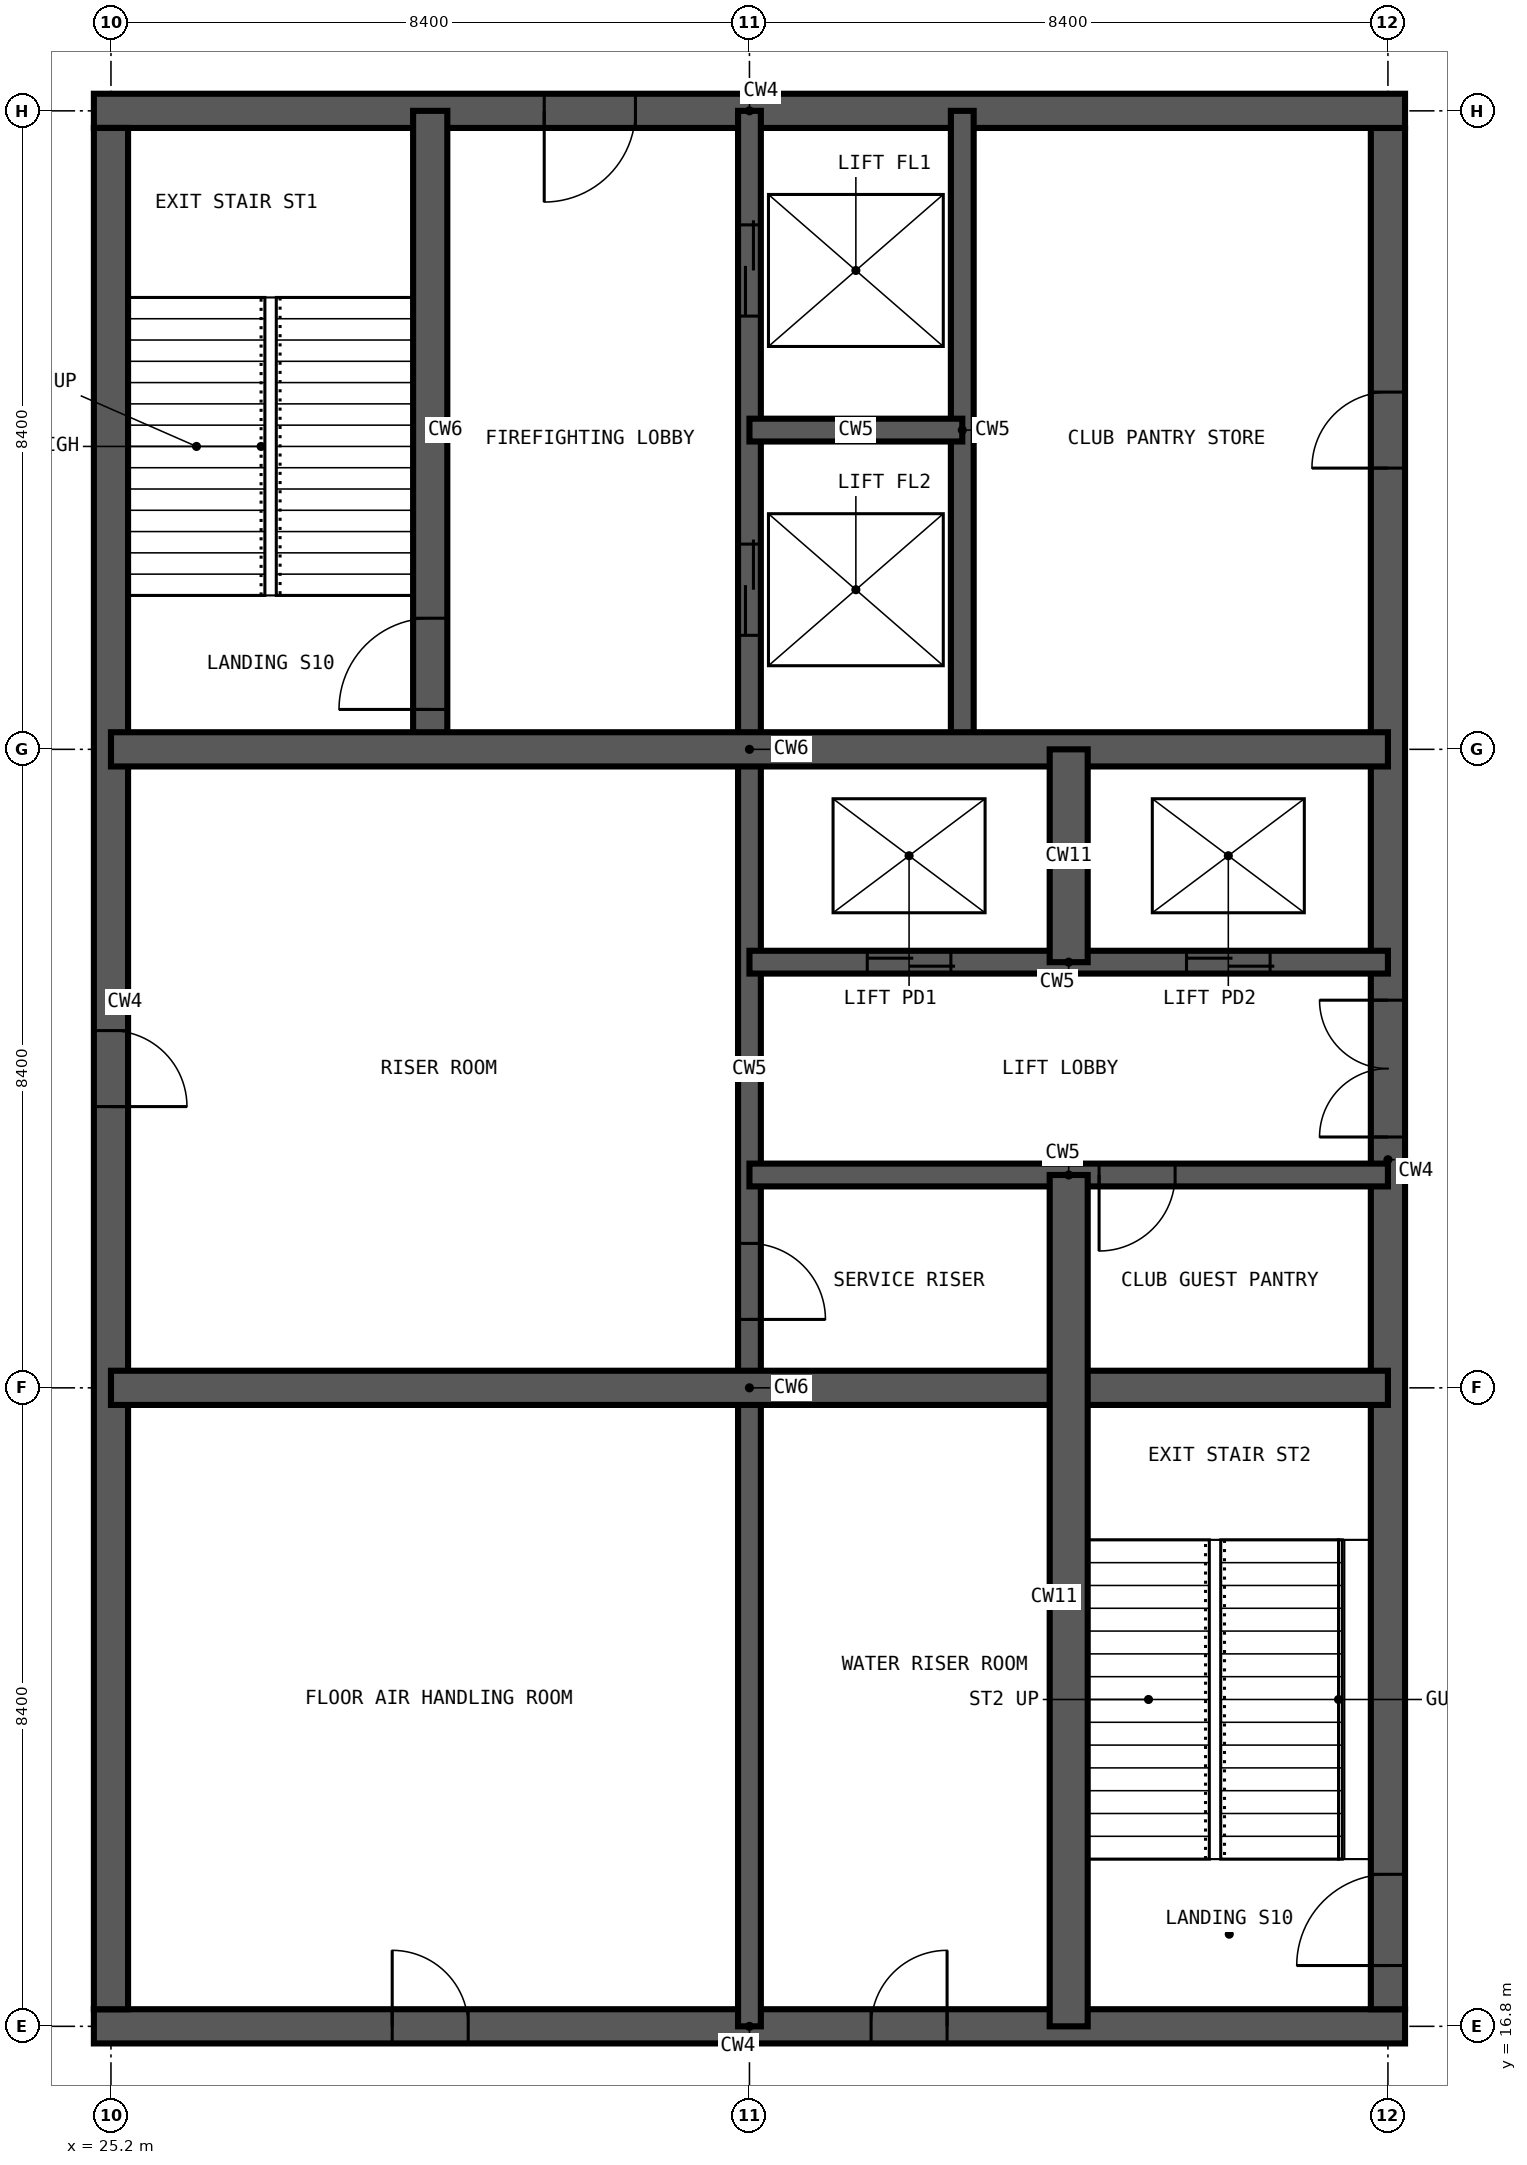
"""IFC4 building model, lengths in metres.
Left out: names, types, materials, properties, quantities, classifications, styles, units other than length and angle.
Written with IfcOpenShell. Run it as: python <this file> out.ifc"""

import sys

from ifc_helpers import new_model, si_unit, direction, frame, frame_2d, origin, place, context, subcontext, project, spatial, rectangle, extrude, element, fill, save


model = new_model("IFC4")
c1 = context("Model", 3, precision=1e-05, world=origin(), true_north=direction((0.0, 1.0)))
c2 = subcontext(c1, "Body", "Model", "MODEL_VIEW")
j1 = project(units=[si_unit("LENGTHUNIT", "METRE"), si_unit("PLANEANGLEUNIT", "RADIAN")], contexts=[c1])
p1 = place(None, origin())
s1 = spatial("IfcSite", under=j1, at=p1, CompositionType="ELEMENT")
p2 = place(p1, origin())
s2 = spatial("IfcBuilding", under=s1, at=p2, CompositionType="ELEMENT")
p3 = place(p2, frame((0.0, 0.0, 284.1)))
s3 = spatial("IfcBuildingStorey", under=s2, at=p3, CompositionType="ELEMENT", Elevation=284.1)
p4 = place(p3, frame((24.975, 16.8, -0.35), z_axis=(0.0, 0.0, 1.0), x_axis=(1.0, 0.0, 0.0)))
e1 = element("IfcWall", 1, at=p4, inside=s3, PredefinedType="SHEAR", context=c2, shape_type="SweptSolid", body=[
    extrude(rectangle(XDim=17.25, YDim=0.45, at=frame_2d((8.625, 0.0))), origin(), (0.0, 0.0, 1.0), 5.0),
])
p5 = place(p4, frame((3.925, 0.0, 0.35)))
e2 = element("IfcOpeningElement", 2, at=p5, cuts=e1, PredefinedType="OPENING", context=c2, shape_type="SweptSolid", body=[
    extrude(rectangle(XDim=1.0, YDim=2.1, at=frame_2d((0.5, 1.05))), frame((0.0, 0.235, 0.0), z_axis=(0.0, -1.0, 0.0), x_axis=(1.0, 0.0, 0.0)), (0.0, 0.0, 1.0), 0.47),
])
p6 = place(p4, frame((10.225, 0.0, 0.35)))
e3 = element("IfcOpeningElement", 3, at=p6, cuts=e1, PredefinedType="OPENING", context=c2, shape_type="SweptSolid", body=[
    extrude(rectangle(XDim=1.0, YDim=2.1, at=frame_2d((0.5, 1.05))), frame((0.0, 0.235, 0.0), z_axis=(0.0, -1.0, 0.0), x_axis=(1.0, 0.0, 0.0)), (0.0, 0.0, 1.0), 0.47),
])
p7 = place(p3, frame((42.0, 17.025, -0.35), z_axis=(0.0, 0.0, 1.0), x_axis=(0.0, 1.0, 0.0)))
e4 = element("IfcWall", 4, at=p7, inside=s3, PredefinedType="SHEAR", context=c2, shape_type="SweptSolid", body=[
    extrude(rectangle(XDim=24.75, YDim=0.45, at=frame_2d((12.375, 0.0))), origin(), (0.0, 0.0, 1.0), 5.0),
])
p8 = place(p7, frame((0.575, 0.0, 0.35)))
e5 = element("IfcOpeningElement", 5, at=p8, cuts=e4, PredefinedType="OPENING", context=c2, shape_type="SweptSolid", body=[
    extrude(rectangle(XDim=1.2, YDim=2.2, at=frame_2d((0.6, 1.1))), frame((0.0, 0.235, 0.0), z_axis=(0.0, -1.0, 0.0), x_axis=(1.0, 0.0, 0.0)), (0.0, 0.0, 1.0), 0.47),
])
p9 = place(p7, frame((11.475, 0.0, 0.35)))
e6 = element("IfcOpeningElement", 6, at=p9, cuts=e4, PredefinedType="OPENING", context=c2, shape_type="SweptSolid", body=[
    extrude(rectangle(XDim=1.8, YDim=2.2, at=frame_2d((0.9, 1.1))), frame((0.0, 0.235, 0.0), z_axis=(0.0, -1.0, 0.0), x_axis=(1.0, 0.0, 0.0)), (0.0, 0.0, 1.0), 0.47),
])
p10 = place(p7, frame((20.275, 0.0, 0.35)))
e7 = element("IfcOpeningElement", 7, at=p10, cuts=e4, PredefinedType="OPENING", context=c2, shape_type="SweptSolid", body=[
    extrude(rectangle(XDim=1.0, YDim=2.1, at=frame_2d((0.5, 1.05))), frame((0.0, 0.235, 0.0), z_axis=(0.0, -1.0, 0.0), x_axis=(1.0, 0.0, 0.0)), (0.0, 0.0, 1.0), 0.47),
])
p11 = place(p3, frame((42.225, 42.0, -0.35), z_axis=(0.0, 0.0, 1.0), x_axis=(-1.0, 0.0, 0.0)))
e8 = element("IfcWall", 8, at=p11, inside=s3, PredefinedType="SHEAR", context=c2, shape_type="SweptSolid", body=[
    extrude(rectangle(XDim=17.25, YDim=0.45, at=frame_2d((8.625, 0.0))), origin(), (0.0, 0.0, 1.0), 5.0),
])
p12 = place(p11, frame((10.125, 0.0, 0.35)))
e9 = element("IfcOpeningElement", 9, at=p12, cuts=e8, PredefinedType="OPENING", context=c2, shape_type="SweptSolid", body=[
    extrude(rectangle(XDim=1.2, YDim=2.2, at=frame_2d((0.6, 1.1))), frame((0.0, 0.235, 0.0), z_axis=(0.0, -1.0, 0.0), x_axis=(1.0, 0.0, 0.0)), (0.0, 0.0, 1.0), 0.47),
])
p13 = place(p3, frame((25.2, 41.775, -0.35), z_axis=(0.0, 0.0, 1.0), x_axis=(0.0, -1.0, 0.0)))
e10 = element("IfcWall", 10, at=p13, inside=s3, PredefinedType="SHEAR", context=c2, shape_type="SweptSolid", body=[
    extrude(rectangle(XDim=24.75, YDim=0.45, at=frame_2d((12.375, 0.0))), origin(), (0.0, 0.0, 1.0), 5.0),
])
p14 = place(p13, frame((11.875, 0.0, 0.35)))
e11 = element("IfcOpeningElement", 11, at=p14, cuts=e10, PredefinedType="OPENING", context=c2, shape_type="SweptSolid", body=[
    extrude(rectangle(XDim=1.0, YDim=2.1, at=frame_2d((0.5, 1.05))), frame((0.0, 0.235, 0.0), z_axis=(0.0, -1.0, 0.0), x_axis=(1.0, 0.0, 0.0)), (0.0, 0.0, 1.0), 0.47),
])
p15 = place(p3, frame((33.6, 16.8, -0.35), z_axis=(0.0, 0.0, 1.0), x_axis=(0.0, 1.0, 0.0)))
e12 = element("IfcWall", 12, at=p15, inside=s3, PredefinedType="SHEAR", context=c2, shape_type="SweptSolid", body=[
    extrude(rectangle(XDim=25.2, YDim=0.3, at=frame_2d((12.6, 0.0))), origin(), (0.0, 0.0, 1.0), 5.0),
])
p16 = place(p15, frame((22.5, 0.0, 0.35)))
e13 = element("IfcOpeningElement", 13, at=p16, cuts=e12, PredefinedType="OPENING", context=c2, shape_type="SweptSolid", body=[
    extrude(rectangle(XDim=1.2, YDim=2.2, at=frame_2d((0.6, 1.1))), frame((0.0, 0.16, 0.0), z_axis=(0.0, -1.0, 0.0), x_axis=(1.0, 0.0, 0.0)), (0.0, 0.0, 1.0), 0.32),
])
p17 = place(p15, frame((18.3, 0.0, 0.35)))
e14 = element("IfcOpeningElement", 14, at=p17, cuts=e12, PredefinedType="OPENING", context=c2, shape_type="SweptSolid", body=[
    extrude(rectangle(XDim=1.2, YDim=2.2, at=frame_2d((0.6, 1.1))), frame((0.0, 0.16, 0.0), z_axis=(0.0, -1.0, 0.0), x_axis=(1.0, 0.0, 0.0)), (0.0, 0.0, 1.0), 0.32),
])
p18 = place(p15, frame((9.3, 0.0, 0.35)))
e15 = element("IfcOpeningElement", 15, at=p18, cuts=e12, PredefinedType="OPENING", context=c2, shape_type="SweptSolid", body=[
    extrude(rectangle(XDim=1.0, YDim=2.1, at=frame_2d((0.5, 1.05))), frame((0.0, 0.16, 0.0), z_axis=(0.0, -1.0, 0.0), x_axis=(1.0, 0.0, 0.0)), (0.0, 0.0, 1.0), 0.32),
])
p19 = place(p3, frame((36.4, 33.6, -0.35), z_axis=(0.0, 0.0, 1.0), x_axis=(0.0, 1.0, 0.0)))
e16 = element("IfcWall", 16, at=p19, inside=s3, PredefinedType="SHEAR", context=c2, shape_type="SweptSolid", body=[
    extrude(rectangle(XDim=8.4, YDim=0.3, at=frame_2d((4.2, 0.0))), origin(), (0.0, 0.0, 1.0), 5.0),
])
p20 = place(p3, frame((33.6, 28.0, -0.35), z_axis=(0.0, 0.0, 1.0), x_axis=(1.0, 0.0, 0.0)))
e17 = element("IfcWall", 17, at=p20, inside=s3, PredefinedType="SHEAR", context=c2, shape_type="SweptSolid", body=[
    extrude(rectangle(XDim=8.4, YDim=0.3, at=frame_2d((4.2, 0.0))), origin(), (0.0, 0.0, 1.0), 5.0),
])
p21 = place(p20, frame((4.6, 0.0, 0.35)))
e18 = element("IfcOpeningElement", 18, at=p21, cuts=e17, PredefinedType="OPENING", context=c2, shape_type="SweptSolid", body=[
    extrude(rectangle(XDim=1.0, YDim=2.1, at=frame_2d((0.5, 1.05))), frame((0.0, 0.16, 0.0), z_axis=(0.0, -1.0, 0.0), x_axis=(1.0, 0.0, 0.0)), (0.0, 0.0, 1.0), 0.32),
])
p22 = place(p3, frame((33.6, 30.8, -0.35), z_axis=(0.0, 0.0, 1.0), x_axis=(1.0, 0.0, 0.0)))
e19 = element("IfcWall", 19, at=p22, inside=s3, PredefinedType="SHEAR", context=c2, shape_type="SweptSolid", body=[
    extrude(rectangle(XDim=8.4, YDim=0.3, at=frame_2d((4.2, 0.0))), origin(), (0.0, 0.0, 1.0), 5.0),
])
p23 = place(p22, frame((1.55, 0.0, 0.35)))
e20 = element("IfcOpeningElement", 20, at=p23, cuts=e19, PredefinedType="OPENING", context=c2, shape_type="SweptSolid", body=[
    extrude(rectangle(XDim=1.1, YDim=2.2, at=frame_2d((0.55, 1.1))), frame((0.0, 0.16, 0.0), z_axis=(0.0, -1.0, 0.0), x_axis=(1.0, 0.0, 0.0)), (0.0, 0.0, 1.0), 0.32),
])
p24 = place(p22, frame((5.75, 0.0, 0.35)))
e21 = element("IfcOpeningElement", 21, at=p24, cuts=e19, PredefinedType="OPENING", context=c2, shape_type="SweptSolid", body=[
    extrude(rectangle(XDim=1.1, YDim=2.2, at=frame_2d((0.55, 1.1))), frame((0.0, 0.16, 0.0), z_axis=(0.0, -1.0, 0.0), x_axis=(1.0, 0.0, 0.0)), (0.0, 0.0, 1.0), 0.32),
])
p25 = place(p3, frame((33.6, 37.8, -0.35), z_axis=(0.0, 0.0, 1.0), x_axis=(1.0, 0.0, 0.0)))
e22 = element("IfcWall", 22, at=p25, inside=s3, PredefinedType="SHEAR", context=c2, shape_type="SweptSolid", body=[
    extrude(rectangle(XDim=2.8, YDim=0.3, at=frame_2d((1.4, 0.0))), origin(), (0.0, 0.0, 1.0), 5.0),
])
p26 = place(p3, frame((29.4, 33.6, -0.35), z_axis=(0.0, 0.0, 1.0), x_axis=(0.0, 1.0, 0.0)))
e23 = element("IfcWall", 23, at=p26, inside=s3, PredefinedType="SHEAR", context=c2, shape_type="SweptSolid", body=[
    extrude(rectangle(XDim=8.4, YDim=0.45, at=frame_2d((4.2, 0.0))), origin(), (0.0, 0.0, 1.0), 5.0),
])
p27 = place(p26, frame((0.525, 0.0, 0.35)))
e24 = element("IfcOpeningElement", 24, at=p27, cuts=e23, PredefinedType="OPENING", context=c2, shape_type="SweptSolid", body=[
    extrude(rectangle(XDim=1.2, YDim=2.2, at=frame_2d((0.6, 1.1))), frame((0.0, 0.235, 0.0), z_axis=(0.0, -1.0, 0.0), x_axis=(1.0, 0.0, 0.0)), (0.0, 0.0, 1.0), 0.47),
])
for number, where, z_axis, x_axis in (
    (25, (25.2, 25.2, -0.35), (0.0, 0.0, 1.0), (1.0, 0.0, 0.0)),
    (26, (25.2, 33.6, -0.35), (0.0, 0.0, 1.0), (1.0, 0.0, 0.0)),
):
    element("IfcWall", number, at=place(p3, frame(where, z_axis=z_axis, x_axis=x_axis)), inside=s3, PredefinedType="SHEAR", context=c2, shape_type="SweptSolid", body=[
        extrude(rectangle(XDim=16.8, YDim=0.45, at=frame_2d((8.4, 0.0))), origin(), (0.0, 0.0, 1.0), 5.0),
    ])
p28 = place(p3, frame((37.8, 16.8, -0.35), z_axis=(0.0, 0.0, 1.0), x_axis=(0.0, 1.0, 0.0)))
e27 = element("IfcWall", 27, at=p28, inside=s3, PredefinedType="SHEAR", context=c2, shape_type="SweptSolid", body=[
    extrude(rectangle(XDim=11.2, YDim=0.5, at=frame_2d((5.6, 0.0))), origin(), (0.0, 0.0, 1.0), 5.0),
])
p29 = place(p3, frame((37.8, 30.8, -0.35), z_axis=(0.0, 0.0, 1.0), x_axis=(0.0, 1.0, 0.0)))
e28 = element("IfcWall", 28, at=p29, inside=s3, PredefinedType="SHEAR", context=c2, shape_type="SweptSolid", body=[
    extrude(rectangle(XDim=2.8, YDim=0.5, at=frame_2d((1.4, 0.0))), origin(), (0.0, 0.0, 1.0), 5.0),
])
p30 = place(p27, origin())
e29 = element("IfcDoor", 29, at=p30, inside=s3, OperationType="SINGLE_SWING_LEFT", PredefinedType="DOOR", context=c2, shape_type="SweptSolid", body=[
    extrude(rectangle(XDim=1.2, YDim=2.2, at=frame_2d((0.6, 1.1))), frame((0.0, 0.025, 0.0), z_axis=(0.0, -1.0, 0.0), x_axis=(1.0, 0.0, 0.0)), (0.0, 0.0, 1.0), 0.05),
])
fill(e24, e29)
p31 = place(p8, origin())
e30 = element("IfcDoor", 30, at=p31, inside=s3, OperationType="SINGLE_SWING_LEFT", PredefinedType="DOOR", context=c2, shape_type="SweptSolid", body=[
    extrude(rectangle(XDim=1.2, YDim=2.2, at=frame_2d((0.6, 1.1))), frame((0.0, 0.025, 0.0), z_axis=(0.0, -1.0, 0.0), x_axis=(1.0, 0.0, 0.0)), (0.0, 0.0, 1.0), 0.05),
])
fill(e5, e30)
p32 = place(p23, origin())
e31 = element("IfcDoor", 31, at=p32, inside=s3, OperationType="DOUBLE_DOOR_SLIDING", PredefinedType="DOOR", context=c2, shape_type="SweptSolid", body=[
    extrude(rectangle(XDim=1.1, YDim=2.2, at=frame_2d((0.55, 1.1))), frame((0.0, 0.025, 0.0), z_axis=(0.0, -1.0, 0.0), x_axis=(1.0, 0.0, 0.0)), (0.0, 0.0, 1.0), 0.05),
])
fill(e20, e31)
p33 = place(p24, origin())
e32 = element("IfcDoor", 32, at=p33, inside=s3, OperationType="DOUBLE_DOOR_SLIDING", PredefinedType="DOOR", context=c2, shape_type="SweptSolid", body=[
    extrude(rectangle(XDim=1.1, YDim=2.2, at=frame_2d((0.55, 1.1))), frame((0.0, 0.025, 0.0), z_axis=(0.0, -1.0, 0.0), x_axis=(1.0, 0.0, 0.0)), (0.0, 0.0, 1.0), 0.05),
])
fill(e21, e32)
p34 = place(p16, origin())
e33 = element("IfcDoor", 33, at=p34, inside=s3, OperationType="DOUBLE_DOOR_SLIDING", PredefinedType="DOOR", context=c2, shape_type="SweptSolid", body=[
    extrude(rectangle(XDim=1.2, YDim=2.2, at=frame_2d((0.6, 1.1))), frame((0.0, 0.025, 0.0), z_axis=(0.0, -1.0, 0.0), x_axis=(1.0, 0.0, 0.0)), (0.0, 0.0, 1.0), 0.05),
])
fill(e13, e33)
p35 = place(p17, origin())
e34 = element("IfcDoor", 34, at=p35, inside=s3, OperationType="DOUBLE_DOOR_SLIDING", PredefinedType="DOOR", context=c2, shape_type="SweptSolid", body=[
    extrude(rectangle(XDim=1.2, YDim=2.2, at=frame_2d((0.6, 1.1))), frame((0.0, 0.025, 0.0), z_axis=(0.0, -1.0, 0.0), x_axis=(1.0, 0.0, 0.0)), (0.0, 0.0, 1.0), 0.05),
])
fill(e14, e34)
p36 = place(p14, origin())
e35 = element("IfcDoor", 35, at=p36, inside=s3, OperationType="SINGLE_SWING_RIGHT", PredefinedType="DOOR", context=c2, shape_type="SweptSolid", body=[
    extrude(rectangle(XDim=1.0, YDim=2.1, at=frame_2d((0.5, 1.05))), frame((0.0, 0.025, 0.0), z_axis=(0.0, -1.0, 0.0), x_axis=(1.0, 0.0, 0.0)), (0.0, 0.0, 1.0), 0.05),
])
fill(e11, e35)
p37 = place(p18, frame((1.0, 0.0, 0.0), z_axis=(0.0, 0.0, 1.0), x_axis=(-1.0, 0.0, 0.0)))
e36 = element("IfcDoor", 36, at=p37, inside=s3, OperationType="SINGLE_SWING_RIGHT", PredefinedType="DOOR", context=c2, shape_type="SweptSolid", body=[
    extrude(rectangle(XDim=1.0, YDim=2.1, at=frame_2d((0.5, 1.05))), frame((0.0, 0.025, 0.0), z_axis=(0.0, -1.0, 0.0), x_axis=(1.0, 0.0, 0.0)), (0.0, 0.0, 1.0), 0.05),
])
fill(e15, e36)
p38 = place(p21, frame((1.0, 0.0, 0.0), z_axis=(0.0, 0.0, 1.0), x_axis=(-1.0, 0.0, 0.0)))
e37 = element("IfcDoor", 37, at=p38, inside=s3, OperationType="SINGLE_SWING_RIGHT", PredefinedType="DOOR", context=c2, shape_type="SweptSolid", body=[
    extrude(rectangle(XDim=1.0, YDim=2.1, at=frame_2d((0.5, 1.05))), frame((0.0, 0.025, 0.0), z_axis=(0.0, -1.0, 0.0), x_axis=(1.0, 0.0, 0.0)), (0.0, 0.0, 1.0), 0.05),
])
fill(e18, e37)
p39 = place(p9, origin())
e38 = element("IfcDoor", 38, at=p39, inside=s3, OperationType="DOUBLE_DOOR_DOUBLE_SWING", PredefinedType="DOOR", context=c2, shape_type="SweptSolid", body=[
    extrude(rectangle(XDim=1.8, YDim=2.2, at=frame_2d((0.9, 1.1))), frame((0.0, 0.025, 0.0), z_axis=(0.0, -1.0, 0.0), x_axis=(1.0, 0.0, 0.0)), (0.0, 0.0, 1.0), 0.05),
])
fill(e6, e38)
p40 = place(p12, origin())
e39 = element("IfcDoor", 39, at=p40, inside=s3, OperationType="SINGLE_SWING_RIGHT", PredefinedType="DOOR", context=c2, shape_type="SweptSolid", body=[
    extrude(rectangle(XDim=1.2, YDim=2.2, at=frame_2d((0.6, 1.1))), frame((0.0, 0.025, 0.0), z_axis=(0.0, -1.0, 0.0), x_axis=(1.0, 0.0, 0.0)), (0.0, 0.0, 1.0), 0.05),
])
fill(e9, e39)
p41 = place(p10, origin())
e40 = element("IfcDoor", 40, at=p41, inside=s3, OperationType="SINGLE_SWING_LEFT", PredefinedType="DOOR", context=c2, shape_type="SweptSolid", body=[
    extrude(rectangle(XDim=1.0, YDim=2.1, at=frame_2d((0.5, 1.05))), frame((0.0, 0.025, 0.0), z_axis=(0.0, -1.0, 0.0), x_axis=(1.0, 0.0, 0.0)), (0.0, 0.0, 1.0), 0.05),
])
fill(e7, e40)
p42 = place(p5, origin())
e41 = element("IfcDoor", 41, at=p42, inside=s3, OperationType="SINGLE_SWING_LEFT", PredefinedType="DOOR", context=c2, shape_type="SweptSolid", body=[
    extrude(rectangle(XDim=1.0, YDim=2.1, at=frame_2d((0.5, 1.05))), frame((0.0, 0.025, 0.0), z_axis=(0.0, -1.0, 0.0), x_axis=(1.0, 0.0, 0.0)), (0.0, 0.0, 1.0), 0.05),
])
fill(e2, e41)
p43 = place(p6, origin())
e42 = element("IfcDoor", 42, at=p43, inside=s3, OperationType="SINGLE_SWING_RIGHT", PredefinedType="DOOR", context=c2, shape_type="SweptSolid", body=[
    extrude(rectangle(XDim=1.0, YDim=2.1, at=frame_2d((0.5, 1.05))), frame((0.0, 0.025, 0.0), z_axis=(0.0, -1.0, 0.0), x_axis=(1.0, 0.0, 0.0)), (0.0, 0.0, 1.0), 0.05),
])
fill(e3, e42)
save(model, sys.argv[1])
